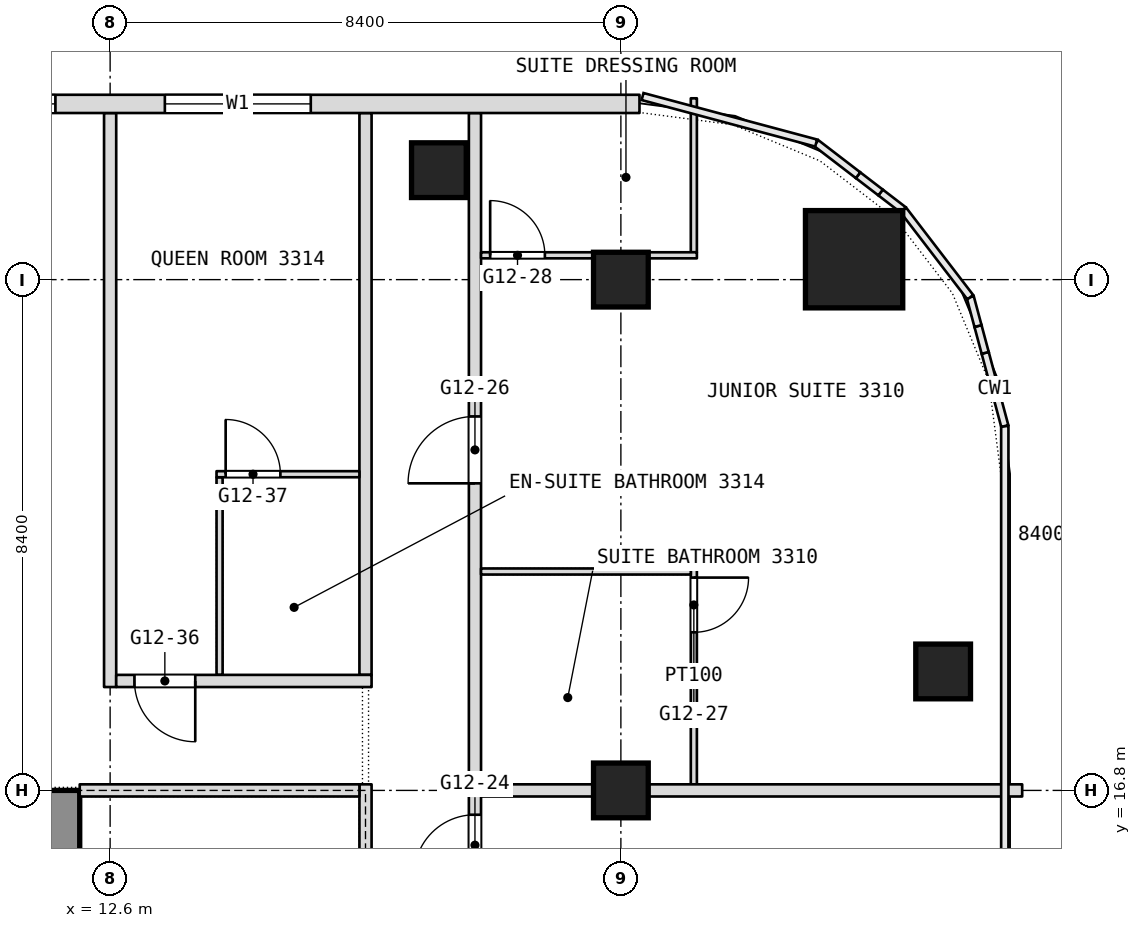
"""IFC4 building model, lengths in metres.
Left out: names, types, materials, properties, quantities, classifications, styles, units other than length and angle.
Written with IfcOpenShell. Run it as: python <this file> out.ifc"""

import sys

from ifc_helpers import new_model, si_unit, direction, frame, frame_2d, origin, origin_2d, place, context, subcontext, project, spatial, rectangle, extrude, element, fill, save


model = new_model("IFC4")
c1 = context("Model", 3, precision=1e-05, world=origin(), true_north=direction((0.0, 1.0)))
c2 = subcontext(c1, "Body", "Model", "MODEL_VIEW")
j1 = project(units=[si_unit("LENGTHUNIT", "METRE"), si_unit("PLANEANGLEUNIT", "RADIAN")], contexts=[c1])
p1 = place(None, origin())
s1 = spatial("IfcSite", under=j1, at=p1, CompositionType="ELEMENT")
p2 = place(p1, origin())
s2 = spatial("IfcBuilding", under=s1, at=p2, CompositionType="ELEMENT")
p3 = place(p2, frame((0.0, 0.0, 144.5)))
s3 = spatial("IfcBuildingStorey", under=s2, at=p3, CompositionType="ELEMENT", Elevation=144.5)
p4 = place(p3, frame((11.6, 0.0, 0.0), z_axis=(0.0, 0.0, 1.0), x_axis=(0.0, 1.0, 0.0)))
e1 = element("IfcWall", 1, at=p4, inside=s3, PredefinedType="SHEAR", context=c2, shape_type="SweptSolid", body=[
    extrude(rectangle(XDim=16.8, YDim=1.0, at=frame_2d((8.4, 0.0))), origin(), (0.0, 0.0, 1.0), 3.6),
])
p5 = place(p4, frame((2.3, 0.0, 0.0)))
e2 = element("IfcOpeningElement", 2, at=p5, cuts=e1, PredefinedType="OPENING", context=c2, shape_type="SweptSolid", body=[
    extrude(rectangle(XDim=1.1, YDim=2.1, at=frame_2d((0.55, 1.05))), frame((0.0, 0.5, 0.0), z_axis=(0.0, -1.0, 0.0), x_axis=(1.0, 0.0, 0.0)), (0.0, 0.0, 1.0), 1.0),
])
p6 = place(p4, frame((4.85, 0.0, 0.0)))
e3 = element("IfcOpeningElement", 3, at=p6, cuts=e1, PredefinedType="OPENING", context=c2, shape_type="SweptSolid", body=[
    extrude(rectangle(XDim=1.1, YDim=2.1, at=frame_2d((0.55, 1.05))), frame((0.0, 0.5, 0.0), z_axis=(0.0, -1.0, 0.0), x_axis=(1.0, 0.0, 0.0)), (0.0, 0.0, 1.0), 1.0),
])
p7 = place(p4, frame((6.825, 0.0, 0.0)))
e4 = element("IfcOpeningElement", 4, at=p7, cuts=e1, PredefinedType="OPENING", context=c2, shape_type="SweptSolid", body=[
    extrude(rectangle(XDim=1.2, YDim=2.1, at=frame_2d((0.6, 1.05))), frame((0.0, 0.5, 0.0), z_axis=(0.0, -1.0, 0.0), x_axis=(1.0, 0.0, 0.0)), (0.0, 0.0, 1.0), 1.0),
])
p8 = place(p4, frame((13.4, 0.0, 0.0)))
e5 = element("IfcOpeningElement", 5, at=p8, cuts=e1, PredefinedType="OPENING", context=c2, shape_type="SweptSolid", body=[
    extrude(rectangle(XDim=1.1, YDim=2.1, at=frame_2d((0.55, 1.05))), frame((0.0, 0.5, 0.0), z_axis=(0.0, -1.0, 0.0), x_axis=(1.0, 0.0, 0.0)), (0.0, 0.0, 1.0), 1.0),
])
p9 = place(p4, frame((10.85, 0.0, 0.0)))
e6 = element("IfcOpeningElement", 6, at=p9, cuts=e1, PredefinedType="OPENING", context=c2, shape_type="SweptSolid", body=[
    extrude(rectangle(XDim=1.1, YDim=2.1, at=frame_2d((0.55, 1.05))), frame((0.0, 0.5, 0.0), z_axis=(0.0, -1.0, 0.0), x_axis=(1.0, 0.0, 0.0)), (0.0, 0.0, 1.0), 1.0),
])
p10 = place(p4, frame((8.775, 0.0, 0.0)))
e7 = element("IfcOpeningElement", 7, at=p10, cuts=e1, PredefinedType="OPENING", context=c2, shape_type="SweptSolid", body=[
    extrude(rectangle(XDim=1.2, YDim=2.1, at=frame_2d((0.6, 1.05))), frame((0.0, 0.5, 0.0), z_axis=(0.0, -1.0, 0.0), x_axis=(1.0, 0.0, 0.0)), (0.0, 0.0, 1.0), 1.0),
])
p11 = place(p3, frame((24.835, 25.535, 0.0), z_axis=(0.0, 0.0, 1.0), x_axis=(1.0, 0.0, 0.0)))
e8 = element("IfcColumn", 8, at=p11, inside=s3, PredefinedType="COLUMN", context=c2, shape_type="SweptSolid", body=[
    extrude(rectangle(XDim=1.6, YDim=1.6, at=origin_2d()), origin(), (0.0, 0.0, 1.0), 3.6),
])
for number, where, z_axis, x_axis in (
    (9, (21.0, 16.8, 0.0), (0.0, 0.0, 1.0), (1.0, 0.0, 0.0)),
    (10, (21.0, 25.2, 0.0), (0.0, 0.0, 1.0), (1.0, 0.0, 0.0)),
    (11, (18.007, 27.0, 0.0), (0.0, 0.0, 1.0), (1.0, 0.0, 0.0)),
    (12, (26.3, 18.756, 0.0), (0.0, 0.0, 1.0), (1.0, 0.0, 0.0)),
):
    element("IfcColumn", number, at=place(p3, frame(where, z_axis=z_axis, x_axis=x_axis)), inside=s3, PredefinedType="COLUMN", context=c2, shape_type="SweptSolid", body=[
        extrude(rectangle(XDim=0.9, YDim=0.9, at=origin_2d()), origin(), (0.0, 0.0, 1.0), 3.6),
    ])
p12 = place(p3, frame((22.2, 16.9, 0.0), z_axis=(0.0, 0.0, 1.0), x_axis=(0.0, 1.0, 0.0)))
e13 = element("IfcWall", 13, at=p12, inside=s3, PredefinedType="PARTITIONING", context=c2, shape_type="SweptSolid", body=[
    extrude(rectangle(XDim=3.55, YDim=0.1, at=frame_2d((1.775, 0.0))), origin(), (0.0, 0.0, 1.0), 3.34),
])
p13 = place(p12, frame((2.5, 0.0, 0.0)))
e14 = element("IfcOpeningElement", 14, at=p13, cuts=e13, PredefinedType="OPENING", context=c2, shape_type="SweptSolid", body=[
    extrude(rectangle(XDim=0.9, YDim=2.1, at=frame_2d((0.45, 1.05))), frame((0.0, 0.05, 0.0), z_axis=(0.0, -1.0, 0.0), x_axis=(1.0, 0.0, 0.0)), (0.0, 0.0, 1.0), 0.1),
])
p14 = place(p3, frame((22.2, 25.65, 0.0), z_axis=(0.0, 0.0, 1.0), x_axis=(0.0, 1.0, 0.0)))
e15 = element("IfcWall", 15, at=p14, inside=s3, PredefinedType="PARTITIONING", context=c2, shape_type="SweptSolid", body=[
    extrude(rectangle(XDim=2.532, YDim=0.1, at=frame_2d((1.266, 0.0))), origin(), (0.0, 0.0, 1.0), 3.34),
])
p15 = place(p3, frame((18.6, -21.708, 0.0), z_axis=(0.0, 0.0, 1.0), x_axis=(0.0, 1.0, 0.0)))
e16 = element("IfcWall", 16, at=p15, inside=s3, PredefinedType="PARTITIONING", context=c2, shape_type="SweptSolid", body=[
    extrude(rectangle(XDim=49.648, YDim=0.2, at=frame_2d((24.824, 0.0))), origin(), (0.0, 0.0, 1.0), 3.34),
])
p16 = place(p15, frame((2.8, 0.0, 0.0)))
e17 = element("IfcOpeningElement", 17, at=p16, cuts=e16, PredefinedType="OPENING", context=c2, shape_type="SweptSolid", body=[
    extrude(rectangle(XDim=1.0, YDim=2.1, at=frame_2d((0.5, 1.05))), frame((0.0, 0.1, 0.0), z_axis=(0.0, -1.0, 0.0), x_axis=(1.0, 0.0, 0.0)), (0.0, 0.0, 1.0), 0.2),
])
p17 = place(p15, frame((7.708, 0.0, 0.0)))
e18 = element("IfcOpeningElement", 18, at=p17, cuts=e16, PredefinedType="OPENING", context=c2, shape_type="SweptSolid", body=[
    extrude(rectangle(XDim=1.0, YDim=2.1, at=frame_2d((0.5, 1.05))), frame((0.0, 0.1, 0.0), z_axis=(0.0, -1.0, 0.0), x_axis=(1.0, 0.0, 0.0)), (0.0, 0.0, 1.0), 0.2),
])
p18 = place(p15, frame((9.508, 0.0, 0.0)))
e19 = element("IfcOpeningElement", 19, at=p18, cuts=e16, PredefinedType="OPENING", context=c2, shape_type="SweptSolid", body=[
    extrude(rectangle(XDim=1.0, YDim=2.1, at=frame_2d((0.5, 1.05))), frame((0.0, 0.1, 0.0), z_axis=(0.0, -1.0, 0.0), x_axis=(1.0, 0.0, 0.0)), (0.0, 0.0, 1.0), 0.2),
])
p19 = place(p15, frame((13.708, 0.0, 0.0)))
e20 = element("IfcOpeningElement", 20, at=p19, cuts=e16, PredefinedType="OPENING", context=c2, shape_type="SweptSolid", body=[
    extrude(rectangle(XDim=1.0, YDim=2.1, at=frame_2d((0.5, 1.05))), frame((0.0, 0.1, 0.0), z_axis=(0.0, -1.0, 0.0), x_axis=(1.0, 0.0, 0.0)), (0.0, 0.0, 1.0), 0.2),
])
p20 = place(p15, frame((20.308, 0.0, 0.0)))
e21 = element("IfcOpeningElement", 21, at=p20, cuts=e16, PredefinedType="OPENING", context=c2, shape_type="SweptSolid", body=[
    extrude(rectangle(XDim=1.0, YDim=2.1, at=frame_2d((0.5, 1.05))), frame((0.0, 0.1, 0.0), z_axis=(0.0, -1.0, 0.0), x_axis=(1.0, 0.0, 0.0)), (0.0, 0.0, 1.0), 0.2),
])
p21 = place(p15, frame((24.508, 0.0, 0.0)))
e22 = element("IfcOpeningElement", 22, at=p21, cuts=e16, PredefinedType="OPENING", context=c2, shape_type="SweptSolid", body=[
    extrude(rectangle(XDim=1.0, YDim=2.1, at=frame_2d((0.5, 1.05))), frame((0.0, 0.1, 0.0), z_axis=(0.0, -1.0, 0.0), x_axis=(1.0, 0.0, 0.0)), (0.0, 0.0, 1.0), 0.2),
])
p22 = place(p15, frame((26.308, 0.0, 0.0)))
e23 = element("IfcOpeningElement", 23, at=p22, cuts=e16, PredefinedType="OPENING", context=c2, shape_type="SweptSolid", body=[
    extrude(rectangle(XDim=1.0, YDim=2.1, at=frame_2d((0.5, 1.05))), frame((0.0, 0.1, 0.0), z_axis=(0.0, -1.0, 0.0), x_axis=(1.0, 0.0, 0.0)), (0.0, 0.0, 1.0), 0.2),
])
p23 = place(p15, frame((30.508, 0.0, 0.0)))
e24 = element("IfcOpeningElement", 24, at=p23, cuts=e16, PredefinedType="OPENING", context=c2, shape_type="SweptSolid", body=[
    extrude(rectangle(XDim=1.0, YDim=2.1, at=frame_2d((0.5, 1.05))), frame((0.0, 0.1, 0.0), z_axis=(0.0, -1.0, 0.0), x_axis=(1.0, 0.0, 0.0)), (0.0, 0.0, 1.0), 0.2),
])
p24 = place(p15, frame((37.108, 0.0, 0.0)))
e25 = element("IfcOpeningElement", 25, at=p24, cuts=e16, PredefinedType="OPENING", context=c2, shape_type="SweptSolid", body=[
    extrude(rectangle(XDim=1.0, YDim=2.1, at=frame_2d((0.5, 1.05))), frame((0.0, 0.1, 0.0), z_axis=(0.0, -1.0, 0.0), x_axis=(1.0, 0.0, 0.0)), (0.0, 0.0, 1.0), 0.2),
])
p25 = place(p15, frame((43.558, 0.0, 0.0)))
e26 = element("IfcOpeningElement", 26, at=p25, cuts=e16, PredefinedType="OPENING", context=c2, shape_type="SweptSolid", body=[
    extrude(rectangle(XDim=1.1, YDim=2.1, at=frame_2d((0.55, 1.05))), frame((0.0, 0.1, 0.0), z_axis=(0.0, -1.0, 0.0), x_axis=(1.0, 0.0, 0.0)), (0.0, 0.0, 1.0), 0.2),
])
p26 = place(p3, frame((16.8, 18.7, 0.0), z_axis=(0.0, 0.0, 1.0), x_axis=(0.0, 1.0, 0.0)))
e27 = element("IfcWall", 27, at=p26, inside=s3, PredefinedType="PARTITIONING", context=c2, shape_type="SweptSolid", body=[
    extrude(rectangle(XDim=9.24, YDim=0.2, at=frame_2d((4.62, 0.0))), origin(), (0.0, 0.0, 1.0), 3.34),
])
p27 = place(p3, frame((14.4, 18.7, 0.0), z_axis=(0.0, 0.0, 1.0), x_axis=(0.0, 1.0, 0.0)))
e28 = element("IfcWall", 28, at=p27, inside=s3, PredefinedType="PARTITIONING", context=c2, shape_type="SweptSolid", body=[
    extrude(rectangle(XDim=3.25, YDim=0.1, at=frame_2d((1.625, 0.0))), origin(), (0.0, 0.0, 1.0), 3.34),
])
p28 = place(p3, frame((12.6, 18.5, 0.0), z_axis=(0.0, 0.0, 1.0), x_axis=(0.0, 1.0, 0.0)))
e29 = element("IfcWall", 29, at=p28, inside=s3, PredefinedType="PARTITIONING", context=c2, shape_type="SweptSolid", body=[
    extrude(rectangle(XDim=9.44, YDim=0.2, at=frame_2d((4.72, 0.0))), origin(), (0.0, 0.0, 1.0), 3.34),
])
p29 = place(p3, frame((18.7, 16.8, 0.0), z_axis=(0.0, 0.0, 1.0), x_axis=(1.0, 0.0, 0.0)))
e30 = element("IfcWall", 30, at=p29, inside=s3, PredefinedType="PARTITIONING", context=c2, shape_type="SweptSolid", body=[
    extrude(rectangle(XDim=8.9, YDim=0.2, at=frame_2d((4.45, 0.0))), origin(), (0.0, 0.0, 1.0), 2.89),
])
p30 = place(p3, frame((12.7, 18.6, 0.0), z_axis=(0.0, 0.0, 1.0), x_axis=(1.0, 0.0, 0.0)))
e31 = element("IfcWall", 31, at=p30, inside=s3, PredefinedType="PARTITIONING", context=c2, shape_type="SweptSolid", body=[
    extrude(rectangle(XDim=4.2, YDim=0.2, at=frame_2d((2.1, 0.0))), origin(), (0.0, 0.0, 1.0), 3.34),
])
p31 = place(p30, frame((0.3, 0.0, 0.0)))
e32 = element("IfcOpeningElement", 32, at=p31, cuts=e31, PredefinedType="OPENING", context=c2, shape_type="SweptSolid", body=[
    extrude(rectangle(XDim=1.0, YDim=2.1, at=frame_2d((0.5, 1.05))), frame((0.0, 0.1, 0.0), z_axis=(0.0, -1.0, 0.0), x_axis=(1.0, 0.0, 0.0)), (0.0, 0.0, 1.0), 0.2),
])
p32 = place(p3, frame((18.7, 20.4, 0.0), z_axis=(0.0, 0.0, 1.0), x_axis=(1.0, 0.0, 0.0)))
e33 = element("IfcWall", 33, at=p32, inside=s3, PredefinedType="PARTITIONING", context=c2, shape_type="SweptSolid", body=[
    extrude(rectangle(XDim=3.45, YDim=0.1, at=frame_2d((1.725, 0.0))), origin(), (0.0, 0.0, 1.0), 3.34),
])
p33 = place(p3, frame((14.35, 22.0, 0.0), z_axis=(0.0, 0.0, 1.0), x_axis=(1.0, 0.0, 0.0)))
e34 = element("IfcWall", 34, at=p33, inside=s3, PredefinedType="PARTITIONING", context=c2, shape_type="SweptSolid", body=[
    extrude(rectangle(XDim=2.35, YDim=0.1, at=frame_2d((1.175, 0.0))), origin(), (0.0, 0.0, 1.0), 3.34),
])
p34 = place(p33, frame((0.15, 0.0, 0.0)))
e35 = element("IfcOpeningElement", 35, at=p34, cuts=e34, PredefinedType="OPENING", context=c2, shape_type="SweptSolid", body=[
    extrude(rectangle(XDim=0.9, YDim=2.1, at=frame_2d((0.45, 1.05))), frame((0.0, 0.05, 0.0), z_axis=(0.0, -1.0, 0.0), x_axis=(1.0, 0.0, 0.0)), (0.0, 0.0, 1.0), 0.1),
])
p35 = place(p3, frame((18.7, 25.6, 0.0), z_axis=(0.0, 0.0, 1.0), x_axis=(1.0, 0.0, 0.0)))
e36 = element("IfcWall", 36, at=p35, inside=s3, PredefinedType="PARTITIONING", context=c2, shape_type="SweptSolid", body=[
    extrude(rectangle(XDim=3.55, YDim=0.1, at=frame_2d((1.775, 0.0))), origin(), (0.0, 0.0, 1.0), 3.34),
])
p36 = place(p35, frame((0.15, 0.0, 0.0)))
e37 = element("IfcOpeningElement", 37, at=p36, cuts=e36, PredefinedType="OPENING", context=c2, shape_type="SweptSolid", body=[
    extrude(rectangle(XDim=0.9, YDim=2.1, at=frame_2d((0.45, 1.05))), frame((0.0, 0.05, 0.0), z_axis=(0.0, -1.0, 0.0), x_axis=(1.0, 0.0, 0.0)), (0.0, 0.0, 1.0), 0.1),
])
p37 = place(p3, frame((21.306, 28.09, 0.0), z_axis=(0.0, 0.0, 1.0), x_axis=(-1.0, 0.0, 0.0)))
e38 = element("IfcWall", 38, at=p37, inside=s3, PredefinedType="NOTDEFINED", context=c2, shape_type="SweptSolid", body=[
    extrude(rectangle(XDim=42.612, YDim=0.3, at=frame_2d((21.306, 0.0))), origin(), (0.0, 0.0, 1.0), 3.6),
])
p38 = place(p37, frame((5.406, 0.0, 0.9)))
e39 = element("IfcOpeningElement", 39, at=p38, cuts=e38, PredefinedType="OPENING", context=c2, shape_type="SweptSolid", body=[
    extrude(rectangle(XDim=2.4, YDim=2.1, at=frame_2d((1.2, 1.05))), frame((0.0, 0.15, 0.0), z_axis=(0.0, -1.0, 0.0), x_axis=(1.0, 0.0, 0.0)), (0.0, 0.0, 1.0), 0.3),
])
p39 = place(p37, frame((9.606, 0.0, 0.9)))
e40 = element("IfcOpeningElement", 40, at=p39, cuts=e38, PredefinedType="OPENING", context=c2, shape_type="SweptSolid", body=[
    extrude(rectangle(XDim=2.4, YDim=2.1, at=frame_2d((1.2, 1.05))), frame((0.0, 0.15, 0.0), z_axis=(0.0, -1.0, 0.0), x_axis=(1.0, 0.0, 0.0)), (0.0, 0.0, 1.0), 0.3),
])
p40 = place(p37, frame((13.806, 0.0, 0.9)))
e41 = element("IfcOpeningElement", 41, at=p40, cuts=e38, PredefinedType="OPENING", context=c2, shape_type="SweptSolid", body=[
    extrude(rectangle(XDim=2.4, YDim=2.1, at=frame_2d((1.2, 1.05))), frame((0.0, 0.15, 0.0), z_axis=(0.0, -1.0, 0.0), x_axis=(1.0, 0.0, 0.0)), (0.0, 0.0, 1.0), 0.3),
])
p41 = place(p37, frame((18.006, 0.0, 0.9)))
e42 = element("IfcOpeningElement", 42, at=p41, cuts=e38, PredefinedType="OPENING", context=c2, shape_type="SweptSolid", body=[
    extrude(rectangle(XDim=2.4, YDim=2.1, at=frame_2d((1.2, 1.05))), frame((0.0, 0.15, 0.0), z_axis=(0.0, -1.0, 0.0), x_axis=(1.0, 0.0, 0.0)), (0.0, 0.0, 1.0), 0.3),
])
p42 = place(p37, frame((22.206, 0.0, 0.9)))
e43 = element("IfcOpeningElement", 43, at=p42, cuts=e38, PredefinedType="OPENING", context=c2, shape_type="SweptSolid", body=[
    extrude(rectangle(XDim=2.4, YDim=2.1, at=frame_2d((1.2, 1.05))), frame((0.0, 0.15, 0.0), z_axis=(0.0, -1.0, 0.0), x_axis=(1.0, 0.0, 0.0)), (0.0, 0.0, 1.0), 0.3),
])
p43 = place(p37, frame((26.406, 0.0, 0.9)))
e44 = element("IfcOpeningElement", 44, at=p43, cuts=e38, PredefinedType="OPENING", context=c2, shape_type="SweptSolid", body=[
    extrude(rectangle(XDim=2.4, YDim=2.1, at=frame_2d((1.2, 1.05))), frame((0.0, 0.15, 0.0), z_axis=(0.0, -1.0, 0.0), x_axis=(1.0, 0.0, 0.0)), (0.0, 0.0, 1.0), 0.3),
])
p44 = place(p37, frame((30.606, 0.0, 0.9)))
e45 = element("IfcOpeningElement", 45, at=p44, cuts=e38, PredefinedType="OPENING", context=c2, shape_type="SweptSolid", body=[
    extrude(rectangle(XDim=2.4, YDim=2.1, at=frame_2d((1.2, 1.05))), frame((0.0, 0.15, 0.0), z_axis=(0.0, -1.0, 0.0), x_axis=(1.0, 0.0, 0.0)), (0.0, 0.0, 1.0), 0.3),
])
p45 = place(p37, frame((34.806, 0.0, 0.9)))
e46 = element("IfcOpeningElement", 46, at=p45, cuts=e38, PredefinedType="OPENING", context=c2, shape_type="SweptSolid", body=[
    extrude(rectangle(XDim=2.4, YDim=2.1, at=frame_2d((1.2, 1.05))), frame((0.0, 0.15, 0.0), z_axis=(0.0, -1.0, 0.0), x_axis=(1.0, 0.0, 0.0)), (0.0, 0.0, 1.0), 0.3),
])
p46 = place(p3, frame((16.8, -0.1, 0.0), z_axis=(0.0, 0.0, 1.0), x_axis=(0.0, 1.0, 0.0)))
e47 = element("IfcWall", 47, at=p46, inside=s3, PredefinedType="PARTITIONING", context=c2, shape_type="SweptSolid", body=[
    extrude(rectangle(XDim=17.0, YDim=0.2, at=frame_2d((8.5, 0.0))), origin(), (0.0, 0.0, 1.0), 3.34),
])
p47 = place(p46, frame((2.2, 0.0, 0.0)))
e48 = element("IfcOpeningElement", 48, at=p47, cuts=e47, PredefinedType="OPENING", context=c2, shape_type="SweptSolid", body=[
    extrude(rectangle(XDim=1.8, YDim=2.1, at=frame_2d((0.9, 1.05))), frame((0.0, 0.1, 0.0), z_axis=(0.0, -1.0, 0.0), x_axis=(1.0, 0.0, 0.0)), (0.0, 0.0, 1.0), 0.2),
])
p48 = place(p46, frame((13.0, 0.0, 0.0)))
e49 = element("IfcOpeningElement", 49, at=p48, cuts=e47, PredefinedType="OPENING", context=c2, shape_type="SweptSolid", body=[
    extrude(rectangle(XDim=1.8, YDim=2.1, at=frame_2d((0.9, 1.05))), frame((0.0, 0.1, 0.0), z_axis=(0.0, -1.0, 0.0), x_axis=(1.0, 0.0, 0.0)), (0.0, 0.0, 1.0), 0.2),
])
p49 = place(p3, frame((12.1, 16.8, 0.0), z_axis=(0.0, 0.0, 1.0), x_axis=(1.0, 0.0, 0.0)))
e50 = element("IfcWall", 50, at=p49, inside=s3, PredefinedType="PARTITIONING", context=c2, shape_type="SweptSolid", body=[
    extrude(rectangle(XDim=4.6, YDim=0.2, at=frame_2d((2.3, 0.0))), origin(), (0.0, 0.0, 1.0), 2.89),
])
p50 = place(p13, origin())
e51 = element("IfcDoor", 51, at=p50, inside=s3, OperationType="SINGLE_SWING_RIGHT", PredefinedType="DOOR", context=c2, shape_type="SweptSolid", body=[
    extrude(rectangle(XDim=0.9, YDim=2.1, at=frame_2d((0.45, 1.05))), frame((0.0, 0.025, 0.0), z_axis=(0.0, -1.0, 0.0), x_axis=(1.0, 0.0, 0.0)), (0.0, 0.0, 1.0), 0.05),
])
fill(e14, e51)
p51 = place(p24, origin())
e52 = element("IfcDoor", 52, at=p51, inside=s3, OperationType="SINGLE_SWING_RIGHT", PredefinedType="DOOR", context=c2, shape_type="SweptSolid", body=[
    extrude(rectangle(XDim=1.0, YDim=2.1, at=frame_2d((0.5, 1.05))), frame((0.0, 0.025, 0.0), z_axis=(0.0, -1.0, 0.0), x_axis=(1.0, 0.0, 0.0)), (0.0, 0.0, 1.0), 0.05),
])
fill(e25, e52)
p52 = place(p25, origin())
e53 = element("IfcDoor", 53, at=p52, inside=s3, OperationType="SINGLE_SWING_RIGHT", PredefinedType="DOOR", context=c2, shape_type="SweptSolid", body=[
    extrude(rectangle(XDim=1.1, YDim=2.1, at=frame_2d((0.55, 1.05))), frame((0.0, 0.025, 0.0), z_axis=(0.0, -1.0, 0.0), x_axis=(1.0, 0.0, 0.0)), (0.0, 0.0, 1.0), 0.05),
])
fill(e26, e53)
p53 = place(p31, origin())
e54 = element("IfcDoor", 54, at=p53, inside=s3, OperationType="SINGLE_SWING_LEFT", PredefinedType="DOOR", context=c2, shape_type="SweptSolid", body=[
    extrude(rectangle(XDim=1.0, YDim=2.1, at=frame_2d((0.5, 1.05))), frame((0.0, 0.025, 0.0), z_axis=(0.0, -1.0, 0.0), x_axis=(1.0, 0.0, 0.0)), (0.0, 0.0, 1.0), 0.05),
])
fill(e32, e54)
p54 = place(p34, origin())
e55 = element("IfcDoor", 55, at=p54, inside=s3, OperationType="SINGLE_SWING_RIGHT", PredefinedType="DOOR", context=c2, shape_type="SweptSolid", body=[
    extrude(rectangle(XDim=0.9, YDim=2.1, at=frame_2d((0.45, 1.05))), frame((0.0, 0.025, 0.0), z_axis=(0.0, -1.0, 0.0), x_axis=(1.0, 0.0, 0.0)), (0.0, 0.0, 1.0), 0.05),
])
fill(e35, e55)
p55 = place(p36, origin())
e56 = element("IfcDoor", 56, at=p55, inside=s3, OperationType="SINGLE_SWING_LEFT", PredefinedType="DOOR", context=c2, shape_type="SweptSolid", body=[
    extrude(rectangle(XDim=0.9, YDim=2.1, at=frame_2d((0.45, 1.05))), frame((0.0, 0.025, 0.0), z_axis=(0.0, -1.0, 0.0), x_axis=(1.0, 0.0, 0.0)), (0.0, 0.0, 1.0), 0.05),
])
fill(e37, e56)
p56 = place(p38, origin())
e57 = element("IfcWindow", 57, at=p56, inside=s3, PartitioningType="SINGLE_PANEL", PredefinedType="WINDOW", context=c2, shape_type="SweptSolid", body=[
    extrude(rectangle(XDim=2.4, YDim=2.1, at=frame_2d((1.2, 1.05))), frame((0.0, 0.03, 0.0), z_axis=(0.0, -1.0, 0.0), x_axis=(1.0, 0.0, 0.0)), (0.0, 0.0, 1.0), 0.06),
])
fill(e39, e57)
p57 = place(p39, origin())
e58 = element("IfcWindow", 58, at=p57, inside=s3, PartitioningType="SINGLE_PANEL", PredefinedType="WINDOW", context=c2, shape_type="SweptSolid", body=[
    extrude(rectangle(XDim=2.4, YDim=2.1, at=frame_2d((1.2, 1.05))), frame((0.0, 0.03, 0.0), z_axis=(0.0, -1.0, 0.0), x_axis=(1.0, 0.0, 0.0)), (0.0, 0.0, 1.0), 0.06),
])
fill(e40, e58)
save(model, sys.argv[1])
